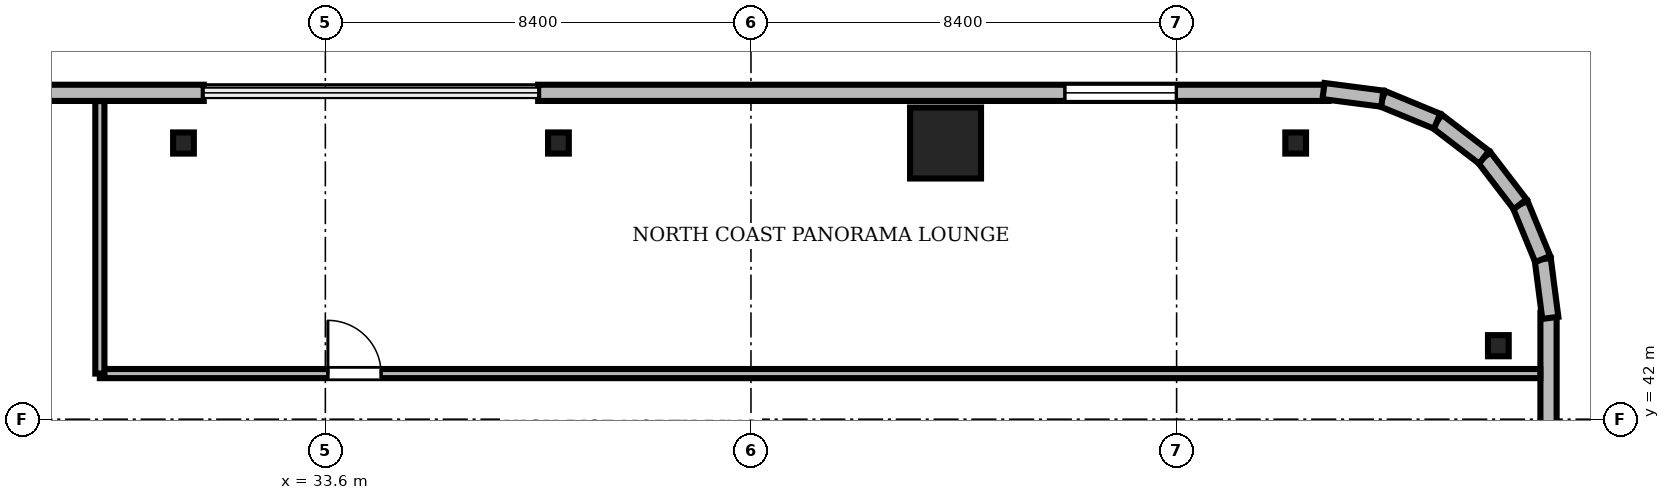
"""IFC4 building model, lengths in metres.
Left out: names, types, materials, properties, quantities, classifications, styles, units other than length and angle.
Written with IfcOpenShell. Run it as: python <this file> out.ifc"""

import sys

from ifc_helpers import new_model, si_unit, direction, frame, frame_2d, origin, origin_2d, place, context, subcontext, project, spatial, rectangle, i_section, extrude, source, transform, mapped, element, fill, save


model = new_model("IFC4")
c1 = context("Model", 3, precision=1e-05, world=origin(), true_north=direction((0.0, 1.0)))
c2 = subcontext(c1, "Body", "Model", "MODEL_VIEW")
j1 = project(units=[si_unit("LENGTHUNIT", "METRE"), si_unit("PLANEANGLEUNIT", "RADIAN")], contexts=[c1])
p1 = place(None, origin())
s1 = spatial("IfcSite", under=j1, at=p1, CompositionType="ELEMENT")
p2 = place(p1, origin())
s2 = spatial("IfcBuilding", under=s1, at=p2, CompositionType="ELEMENT")
p3 = place(p2, frame((0.0, 0.0, 214.8)))
s3 = spatial("IfcBuildingStorey", under=s2, at=p3, CompositionType="ELEMENT", Elevation=214.8)
m1 = source(origin(), c2, "Body", "SweptSolid", [
    extrude(rectangle(XDim=1.4, YDim=1.4, at=origin_2d()), origin(), (0.0, 0.0, 1.0), 3.53),
])
p4 = place(p3, frame((45.84, 47.45, 0.0), z_axis=(0.0, 0.0, 1.0), x_axis=(1.0, 0.0, 0.0)))
e1 = element("IfcColumn", 1, at=p4, inside=s3, PredefinedType="COLUMN", context=c2, shape_type="MappedRepresentation", body=[
    mapped(m1, transform((0.0, 0.0, 0.0), scale=1.0)),
])
m2 = source(origin(), c2, "Body", "SweptSolid", [
    extrude(i_section(OverallWidth=0.409, OverallDepth=0.417, WebThickness=0.021, FlangeThickness=0.033, FilletRadius=0.015, at=origin_2d()), origin(), (0.0, 0.0, 1.0), 3.53),
])
for number, where, z_axis, x_axis in (
    (2, (56.75, 43.45, 0.0), (0.0, 0.0, 1.0), (1.0, 0.0, 0.0)),
    (3, (52.75, 47.45, 0.0), (0.0, 0.0, 1.0), (1.0, 0.0, 0.0)),
    (4, (38.2, 47.45, 0.0), (0.0, 0.0, 1.0), (1.0, 0.0, 0.0)),
    (5, (30.8, 47.45, 0.0), (0.0, 0.0, 1.0), (1.0, 0.0, 0.0)),
):
    element("IfcColumn", number, at=place(p3, frame(where, z_axis=z_axis, x_axis=x_axis)), inside=s3, PredefinedType="COLUMN", context=c2, shape_type="MappedRepresentation", body=[
        mapped(m2, transform((0.0, 0.0, 0.0), scale=1.0)),
    ])
m3 = source(origin(), c2, "Body", "SweptSolid", [
    extrude(rectangle(XDim=15.6, YDim=0.32, at=frame_2d((7.8, 0.0))), origin(), (0.0, 0.0, 1.0), 3.53),
])
p5 = place(p3, frame((53.4, 48.44, 0.0), z_axis=(0.0, 0.0, 1.0), x_axis=(-1.0, 0.0, 0.0)))
e6 = element("IfcWall", 6, at=p5, inside=s3, PredefinedType="SOLIDWALL", context=c2, shape_type="MappedRepresentation", body=[
    mapped(m3, transform((0.0, 0.0, 0.0), scale=1.0)),
])
m4 = source(origin(), c2, "Body", "SweptSolid", [
    extrude(rectangle(XDim=2.2, YDim=2.4, at=frame_2d((1.1, 1.2))), frame((0.0, 0.17, 0.0), z_axis=(0.0, -1.0, 0.0), x_axis=(1.0, 0.0, 0.0)), (0.0, 0.0, 1.0), 0.34),
])
p6 = place(p5, frame((3.005, 0.0, 0.72)))
e7 = element("IfcOpeningElement", 7, at=p6, cuts=e6, PredefinedType="OPENING", context=c2, shape_type="MappedRepresentation", body=[
    mapped(m4, transform((0.0, 0.0, 0.0), scale=1.0)),
])
p7 = place(p3, frame((31.2, 48.44, 0.0), z_axis=(0.0, 0.0, 1.0), x_axis=(-1.0, 0.0, 0.0)))
e8 = element("IfcWall", 8, at=p7, inside=s3, PredefinedType="SOLIDWALL", context=c2, shape_type="MappedRepresentation", body=[
    mapped(m3, transform((0.0, 0.0, 0.0), scale=1.0)),
])
m5 = source(origin(), c2, "Body", "SweptSolid", [
    extrude(rectangle(XDim=1.4, YDim=2.3, at=frame_2d((0.7, 1.15))), frame((0.0, 0.17, 0.0), z_axis=(0.0, -1.0, 0.0), x_axis=(1.0, 0.0, 0.0)), (0.0, 0.0, 1.0), 0.34),
])
p8 = place(p7, frame((4.59, 0.0, 0.0)))
e9 = element("IfcOpeningElement", 9, at=p8, cuts=e8, PredefinedType="OPENING", context=c2, shape_type="MappedRepresentation", body=[
    mapped(m5, transform((0.0, 0.0, 0.0), scale=1.0)),
])
p9 = place(p7, frame((10.395, 0.0, 0.72)))
e10 = element("IfcOpeningElement", 10, at=p9, cuts=e8, PredefinedType="OPENING", context=c2, shape_type="MappedRepresentation", body=[
    mapped(m4, transform((0.0, 0.0, 0.0), scale=1.0)),
])
m6 = source(origin(), c2, "Body", "SweptSolid", [
    extrude(rectangle(XDim=15.6, YDim=0.32, at=frame_2d((7.8, 0.0))), origin(), (0.0, 0.0, 1.0), 3.53),
])
p10 = place(p3, frame((57.74, 28.5, 0.0), z_axis=(0.0, 0.0, 1.0), x_axis=(0.0, 1.0, 0.0)))
e11 = element("IfcWall", 11, at=p10, inside=s3, PredefinedType="SOLIDWALL", context=c2, shape_type="MappedRepresentation", body=[
    mapped(m6, transform((0.0, 0.0, 0.0), scale=1.0)),
])
p11 = place(p10, frame((10.395, 0.0, 0.72)))
e12 = element("IfcOpeningElement", 12, at=p11, cuts=e11, PredefinedType="OPENING", context=c2, shape_type="MappedRepresentation", body=[
    mapped(m4, transform((0.0, 0.0, 0.0), scale=1.0)),
])
m7 = source(origin(), c2, "Body", "SweptSolid", [
    extrude(rectangle(XDim=1.17, YDim=0.32, at=frame_2d((0.585, 0.0))), origin(), (0.0, 0.0, 1.0), 3.53),
])
p12 = place(p3, frame((57.776, 44.0, 0.0), z_axis=(0.0, 0.0, 1.0), x_axis=(-0.128295670475, 0.991735963317, 0.0)))
e13 = element("IfcWall", 13, at=p12, inside=s3, PredefinedType="SOLIDWALL", context=c2, shape_type="MappedRepresentation", body=[
    mapped(m7, transform((0.0, 0.0, 0.0), scale=1.0)),
])
m8 = source(origin(), c2, "Body", "SweptSolid", [
    extrude(rectangle(XDim=1.169, YDim=0.32, at=frame_2d((0.584, 0.0))), origin(), (0.0, 0.0, 1.0), 3.53),
])
p13 = place(p3, frame((57.625, 45.16, 0.0), z_axis=(0.0, 0.0, 1.0), x_axis=(-0.381054331552, 0.924552646638, 0.0)))
e14 = element("IfcWall", 14, at=p13, inside=s3, PredefinedType="SOLIDWALL", context=c2, shape_type="MappedRepresentation", body=[
    mapped(m8, transform((0.0, 0.0, 0.0), scale=1.0)),
])
m9 = source(origin(), c2, "Body", "SweptSolid", [
    extrude(rectangle(XDim=1.169, YDim=0.32, at=frame_2d((0.584, 0.0))), origin(), (0.0, 0.0, 1.0), 3.53),
])
p14 = place(p3, frame((57.18, 46.241, 0.0), z_axis=(0.0, 0.0, 1.0), x_axis=(-0.608387696831, 0.793639975269, 0.0)))
e15 = element("IfcWall", 15, at=p14, inside=s3, PredefinedType="SOLIDWALL", context=c2, shape_type="MappedRepresentation", body=[
    mapped(m9, transform((0.0, 0.0, 0.0), scale=1.0)),
])
m10 = source(origin(), c2, "Body", "SweptSolid", [
    extrude(rectangle(XDim=1.169, YDim=0.32, at=frame_2d((0.584, 0.0))), origin(), (0.0, 0.0, 1.0), 3.53),
])
p15 = place(p3, frame((56.469, 47.169, 0.0), z_axis=(0.0, 0.0, 1.0), x_axis=(-0.793663520347, 0.608356981114, 0.0)))
e16 = element("IfcWall", 16, at=p15, inside=s3, PredefinedType="SOLIDWALL", context=c2, shape_type="MappedRepresentation", body=[
    mapped(m10, transform((0.0, 0.0, 0.0), scale=1.0)),
])
p16 = place(p3, frame((55.541, 47.88, 0.0), z_axis=(0.0, 0.0, 1.0), x_axis=(-0.924552646638, 0.381054331552, 0.0)))
e17 = element("IfcWall", 17, at=p16, inside=s3, PredefinedType="SOLIDWALL", context=c2, shape_type="MappedRepresentation", body=[
    mapped(m8, transform((0.0, 0.0, 0.0), scale=1.0)),
])
p17 = place(p3, frame((54.46, 48.325, 0.0), z_axis=(0.0, 0.0, 1.0), x_axis=(-0.991735963317, 0.128295670475, 0.0)))
e18 = element("IfcWall", 18, at=p17, inside=s3, PredefinedType="SOLIDWALL", context=c2, shape_type="MappedRepresentation", body=[
    mapped(m7, transform((0.0, 0.0, 0.0), scale=1.0)),
])
m11 = source(origin(), c2, "Body", "SweptSolid", [
    extrude(rectangle(XDim=28.428, YDim=0.18, at=frame_2d((14.214, 0.0))), origin(), (0.0, 0.0, 1.0), 2.772),
])
p18 = place(p3, frame((29.15, 42.9, 0.0), z_axis=(0.0, 0.0, 1.0), x_axis=(1.0, 0.0, 0.0)))
e19 = element("IfcWall", 19, at=p18, inside=s3, PredefinedType="PARTITIONING", context=c2, shape_type="MappedRepresentation", body=[
    mapped(m11, transform((0.0, 0.0, 0.0), scale=1.0)),
])
m12 = source(origin(), c2, "Body", "SweptSolid", [
    extrude(rectangle(XDim=1.05, YDim=2.2, at=frame_2d((0.525, 1.1))), frame((0.0, 0.1, 0.0), z_axis=(0.0, -1.0, 0.0), x_axis=(1.0, 0.0, 0.0)), (0.0, 0.0, 1.0), 0.2),
])
p19 = place(p18, frame((4.5, 0.0, 0.0)))
e20 = element("IfcOpeningElement", 20, at=p19, cuts=e19, PredefinedType="OPENING", context=c2, shape_type="MappedRepresentation", body=[
    mapped(m12, transform((0.0, 0.0, 0.0), scale=1.0)),
])
m13 = source(origin(), c2, "Body", "SweptSolid", [
    extrude(rectangle(XDim=5.378, YDim=0.18, at=frame_2d((2.689, 0.0))), origin(), (0.0, 0.0, 1.0), 2.772),
])
p20 = place(p3, frame((29.15, 42.9, 0.0), z_axis=(0.0, 0.0, 1.0), x_axis=(0.0, 1.0, 0.0)))
e21 = element("IfcWall", 21, at=p20, inside=s3, PredefinedType="PARTITIONING", context=c2, shape_type="MappedRepresentation", body=[
    mapped(m13, transform((0.0, 0.0, 0.0), scale=1.0)),
])
m14 = source(origin(), c2, "Body", "SweptSolid", [
    extrude(rectangle(XDim=2.2, YDim=2.4, at=frame_2d((1.1, 1.2))), frame((0.0, 0.03, 0.0), z_axis=(0.0, -1.0, 0.0), x_axis=(1.0, 0.0, 0.0)), (0.0, 0.0, 1.0), 0.06),
])
p21 = place(p6, origin())
e22 = element("IfcWindow", 22, at=p21, inside=s3, PartitioningType="SINGLE_PANEL", PredefinedType="WINDOW", context=c2, shape_type="MappedRepresentation", body=[
    mapped(m14, transform((0.0, 0.0, 0.0), scale=1.0)),
])
fill(e7, e22)
m15 = source(origin(), c2, "Body", "SweptSolid", [
    extrude(rectangle(XDim=1.05, YDim=2.2, at=frame_2d((0.525, 1.1))), frame((0.0, 0.025, 0.0), z_axis=(0.0, -1.0, 0.0), x_axis=(1.0, 0.0, 0.0)), (0.0, 0.0, 1.0), 0.05),
])
p22 = place(p19, origin())
e23 = element("IfcDoor", 23, at=p22, inside=s3, OperationType="SINGLE_SWING_LEFT", PredefinedType="DOOR", context=c2, shape_type="MappedRepresentation", body=[
    mapped(m15, transform((0.0, 0.0, 0.0), scale=1.0)),
])
fill(e20, e23)
save(model, sys.argv[1])
